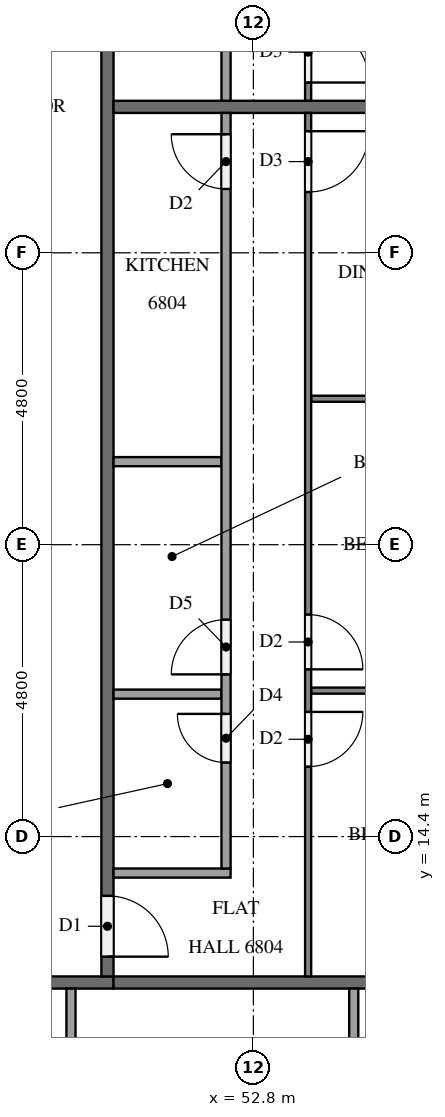
"""IFC4 building model, lengths in metres.
Left out: names, types, materials, properties, quantities, classifications, styles, units other than length and angle.
Written with IfcOpenShell. Run it as: python <this file> out.ifc"""

import sys

from ifc_helpers import new_model, si_unit, direction, frame, frame_2d, origin, place, context, subcontext, project, spatial, rectangle, extrude, element, fill, save


model = new_model("IFC4")
c1 = context("Model", 3, precision=1e-05, world=origin(), true_north=direction((0.0, 1.0)))
c2 = subcontext(c1, "Body", "Model", "MODEL_VIEW")
j1 = project(units=[si_unit("LENGTHUNIT", "METRE"), si_unit("PLANEANGLEUNIT", "RADIAN")], contexts=[c1])
p1 = place(None, origin())
s1 = spatial("IfcSite", under=j1, at=p1, CompositionType="ELEMENT")
p2 = place(p1, origin())
s2 = spatial("IfcBuilding", under=s1, at=p2, CompositionType="ELEMENT")
p3 = place(p2, frame((0.0, 0.0, 259.7)))
s3 = spatial("IfcBuildingStorey", under=s2, at=p3, CompositionType="ELEMENT", Elevation=259.7)
p4 = place(p3, frame((50.5, 12.0, 0.0), z_axis=(0.0, 0.0, 1.0), x_axis=(-1.0, 0.0, 0.0)))
e1 = element("IfcWall", 1, at=p4, inside=s3, PredefinedType="PARTITIONING", context=c2, shape_type="SweptSolid", body=[
    extrude(rectangle(XDim=38.6, YDim=0.2, at=frame_2d((19.3, 0.0))), origin(), (0.0, 0.0, 1.0), 3.1),
])
p5 = place(p4, frame((19.675, 0.0, 0.0)))
e2 = element("IfcOpeningElement", 2, at=p5, cuts=e1, PredefinedType="OPENING", context=c2, shape_type="SweptSolid", body=[
    extrude(rectangle(XDim=1.1, YDim=2.1, at=frame_2d((0.55, 1.05))), frame((0.0, 0.11, 0.0), z_axis=(0.0, -1.0, 0.0), x_axis=(1.0, 0.0, 0.0)), (0.0, 0.0, 1.0), 0.22),
])
p6 = place(p4, frame((2.925, 0.0, 0.0)))
e3 = element("IfcOpeningElement", 3, at=p6, cuts=e1, PredefinedType="OPENING", context=c2, shape_type="SweptSolid", body=[
    extrude(rectangle(XDim=1.0, YDim=2.1, at=frame_2d((0.5, 1.05))), frame((0.0, 0.11, 0.0), z_axis=(0.0, -1.0, 0.0), x_axis=(1.0, 0.0, 0.0)), (0.0, 0.0, 1.0), 0.22),
])
p7 = place(p4, frame((1.075, 0.0, 0.0)))
e4 = element("IfcOpeningElement", 4, at=p7, cuts=e1, PredefinedType="OPENING", context=c2, shape_type="SweptSolid", body=[
    extrude(rectangle(XDim=1.0, YDim=2.1, at=frame_2d((0.5, 1.05))), frame((0.0, 0.11, 0.0), z_axis=(0.0, -1.0, 0.0), x_axis=(1.0, 0.0, 0.0)), (0.0, 0.0, 1.0), 0.22),
])
p8 = place(p3, frame((50.4, 40.7, 0.0), z_axis=(0.0, 0.0, 1.0), x_axis=(0.0, -1.0, 0.0)))
e5 = element("IfcWall", 5, at=p8, inside=s3, PredefinedType="PARTITIONING", context=c2, shape_type="SweptSolid", body=[
    extrude(rectangle(XDim=28.6, YDim=0.2, at=frame_2d((14.3, 0.0))), origin(), (0.0, 0.0, 1.0), 3.1),
])
p9 = place(p8, frame((27.275, 0.0, 0.0)))
e6 = element("IfcOpeningElement", 6, at=p9, cuts=e5, PredefinedType="OPENING", context=c2, shape_type="SweptSolid", body=[
    extrude(rectangle(XDim=1.0, YDim=2.1, at=frame_2d((0.5, 1.05))), frame((0.0, 0.11, 0.0), z_axis=(0.0, -1.0, 0.0), x_axis=(1.0, 0.0, 0.0)), (0.0, 0.0, 1.0), 0.22),
])
p10 = place(p8, frame((7.525, 0.0, 0.0)))
e7 = element("IfcOpeningElement", 7, at=p10, cuts=e5, PredefinedType="OPENING", context=c2, shape_type="SweptSolid", body=[
    extrude(rectangle(XDim=1.0, YDim=2.1, at=frame_2d((0.5, 1.05))), frame((0.0, 0.11, 0.0), z_axis=(0.0, -1.0, 0.0), x_axis=(1.0, 0.0, 0.0)), (0.0, 0.0, 1.0), 0.22),
])
p11 = place(p8, frame((5.675, 0.0, 0.0)))
e8 = element("IfcOpeningElement", 8, at=p11, cuts=e5, PredefinedType="OPENING", context=c2, shape_type="SweptSolid", body=[
    extrude(rectangle(XDim=1.0, YDim=2.1, at=frame_2d((0.5, 1.05))), frame((0.0, 0.11, 0.0), z_axis=(0.0, -1.0, 0.0), x_axis=(1.0, 0.0, 0.0)), (0.0, 0.0, 1.0), 0.22),
])
for number, where, z_axis, x_axis in (
    (9, (50.5, 12.0, 0.0), (0.0, 0.0, 1.0), (1.0, 0.0, 0.0)),
    (10, (50.5, 26.4, 0.0), (0.0, 0.0, 1.0), (1.0, 0.0, 0.0)),
):
    element("IfcWall", number, at=place(p3, frame(where, z_axis=z_axis, x_axis=x_axis)), inside=s3, PredefinedType="PARTITIONING", context=c2, shape_type="SweptSolid", body=[
        extrude(rectangle(XDim=7.0, YDim=0.2, at=frame_2d((3.5, 0.0))), origin(), (0.0, 0.0, 1.0), 3.1),
    ])
p12 = place(p3, frame((54.45, 11.9, 0.0), z_axis=(0.0, 0.0, 1.0), x_axis=(0.0, -1.0, 0.0)))
e11 = element("IfcWall", 11, at=p12, inside=s3, PredefinedType="PARTITIONING", context=c2, shape_type="SweptSolid", body=[
    extrude(rectangle(XDim=2.075, YDim=0.15, at=frame_2d((1.038, 0.0))), origin(), (0.0, 0.0, 1.0), 3.1),
])
p13 = place(p3, frame((49.8, 11.9, 0.0), z_axis=(0.0, 0.0, 1.0), x_axis=(0.0, -1.0, 0.0)))
e12 = element("IfcWall", 12, at=p13, inside=s3, PredefinedType="PARTITIONING", context=c2, shape_type="SweptSolid", body=[
    extrude(rectangle(XDim=2.225, YDim=0.15, at=frame_2d((1.112, 0.0))), origin(), (0.0, 0.0, 1.0), 3.1),
])
for number, where, z_axis, x_axis in (
    (13, (53.75, 16.8, 0.0), (0.0, 0.0, 1.0), (1.0, 0.0, 0.0)),
    (14, (53.75, 21.6, 0.0), (0.0, 0.0, 1.0), (1.0, 0.0, 0.0)),
):
    element("IfcWall", number, at=place(p3, frame(where, z_axis=z_axis, x_axis=x_axis)), inside=s3, PredefinedType="PARTITIONING", context=c2, shape_type="SweptSolid", body=[
        extrude(rectangle(XDim=3.75, YDim=0.1, at=frame_2d((1.875, 0.0))), origin(), (0.0, 0.0, 1.0), 3.1),
    ])
p14 = place(p3, frame((53.7, 26.3, 0.0), z_axis=(0.0, 0.0, 1.0), x_axis=(0.0, -1.0, 0.0)))
e15 = element("IfcWall", 15, at=p14, inside=s3, PredefinedType="PARTITIONING", context=c2, shape_type="SweptSolid", body=[
    extrude(rectangle(XDim=14.2, YDim=0.1, at=frame_2d((7.1, 0.0))), origin(), (0.0, 0.0, 1.0), 3.1),
])
p15 = place(p14, frame((9.85, 0.0, 0.0)))
e16 = element("IfcOpeningElement", 16, at=p15, cuts=e15, PredefinedType="OPENING", context=c2, shape_type="SweptSolid", body=[
    extrude(rectangle(XDim=0.9, YDim=2.1, at=frame_2d((0.45, 1.05))), frame((0.0, 0.06, 0.0), z_axis=(0.0, -1.0, 0.0), x_axis=(1.0, 0.0, 0.0)), (0.0, 0.0, 1.0), 0.12),
])
p16 = place(p14, frame((8.25, 0.0, 0.0)))
e17 = element("IfcOpeningElement", 17, at=p16, cuts=e15, PredefinedType="OPENING", context=c2, shape_type="SweptSolid", body=[
    extrude(rectangle(XDim=0.9, YDim=2.1, at=frame_2d((0.45, 1.05))), frame((0.0, 0.06, 0.0), z_axis=(0.0, -1.0, 0.0), x_axis=(1.0, 0.0, 0.0)), (0.0, 0.0, 1.0), 0.12),
])
p17 = place(p14, frame((0.3, 0.0, 0.0)))
e18 = element("IfcOpeningElement", 18, at=p17, cuts=e15, PredefinedType="OPENING", context=c2, shape_type="SweptSolid", body=[
    extrude(rectangle(XDim=1.0, YDim=2.1, at=frame_2d((0.5, 1.05))), frame((0.0, 0.06, 0.0), z_axis=(0.0, -1.0, 0.0), x_axis=(1.0, 0.0, 0.0)), (0.0, 0.0, 1.0), 0.12),
])
for number, where, z_axis, x_axis in (
    (19, (50.5, 16.742, 0.0), (0.0, 0.0, 1.0), (1.0, 0.0, 0.0)),
    (20, (50.5, 20.565, 0.0), (0.0, 0.0, 1.0), (1.0, 0.0, 0.0)),
):
    element("IfcWall", number, at=place(p3, frame(where, z_axis=z_axis, x_axis=x_axis)), inside=s3, PredefinedType="PARTITIONING", context=c2, shape_type="SweptSolid", body=[
        extrude(rectangle(XDim=1.775, YDim=0.15, at=frame_2d((0.887, 0.0))), origin(), (0.0, 0.0, 1.0), 3.1),
    ])
p18 = place(p3, frame((50.5, 13.8, 0.0), z_axis=(0.0, 0.0, 1.0), x_axis=(1.0, 0.0, 0.0)))
e21 = element("IfcWall", 21, at=p18, inside=s3, PredefinedType="PARTITIONING", context=c2, shape_type="SweptSolid", body=[
    extrude(rectangle(XDim=1.925, YDim=0.15, at=frame_2d((0.962, 0.0))), origin(), (0.0, 0.0, 1.0), 3.1),
])
p19 = place(p3, frame((52.35, 13.875, 0.0), z_axis=(0.0, 0.0, 1.0), x_axis=(0.0, 1.0, 0.0)))
e22 = element("IfcWall", 22, at=p19, inside=s3, PredefinedType="PARTITIONING", context=c2, shape_type="SweptSolid", body=[
    extrude(rectangle(XDim=12.425, YDim=0.15, at=frame_2d((6.212, 0.0))), origin(), (0.0, 0.0, 1.0), 3.1),
])
p20 = place(p19, frame((1.742, 0.0, 0.0)))
e23 = element("IfcOpeningElement", 23, at=p20, cuts=e22, PredefinedType="OPENING", context=c2, shape_type="SweptSolid", body=[
    extrude(rectangle(XDim=0.8, YDim=2.1, at=frame_2d((0.4, 1.05))), frame((0.0, 0.085, 0.0), z_axis=(0.0, -1.0, 0.0), x_axis=(1.0, 0.0, 0.0)), (0.0, 0.0, 1.0), 0.17),
])
p21 = place(p19, frame((3.192, 0.0, 0.0)))
e24 = element("IfcOpeningElement", 24, at=p21, cuts=e22, PredefinedType="OPENING", context=c2, shape_type="SweptSolid", body=[
    extrude(rectangle(XDim=0.9, YDim=2.1, at=frame_2d((0.45, 1.05))), frame((0.0, 0.085, 0.0), z_axis=(0.0, -1.0, 0.0), x_axis=(1.0, 0.0, 0.0)), (0.0, 0.0, 1.0), 0.17),
])
p22 = place(p19, frame((11.175, 0.0, 0.0)))
e25 = element("IfcOpeningElement", 25, at=p22, cuts=e22, PredefinedType="OPENING", context=c2, shape_type="SweptSolid", body=[
    extrude(rectangle(XDim=0.9, YDim=2.1, at=frame_2d((0.45, 1.05))), frame((0.0, 0.085, 0.0), z_axis=(0.0, -1.0, 0.0), x_axis=(1.0, 0.0, 0.0)), (0.0, 0.0, 1.0), 0.17),
])
p23 = place(p3, frame((53.7, 33.5, 0.0), z_axis=(0.0, 0.0, 1.0), x_axis=(0.0, -1.0, 0.0)))
e26 = element("IfcWall", 26, at=p23, inside=s3, PredefinedType="PARTITIONING", context=c2, shape_type="SweptSolid", body=[
    extrude(rectangle(XDim=7.0, YDim=0.1, at=frame_2d((3.5, 0.0))), origin(), (0.0, 0.0, 1.0), 3.1),
])
p24 = place(p23, frame((5.7, 0.0, 0.0)))
e27 = element("IfcOpeningElement", 27, at=p24, cuts=e26, PredefinedType="OPENING", context=c2, shape_type="SweptSolid", body=[
    extrude(rectangle(XDim=1.0, YDim=2.1, at=frame_2d((0.5, 1.05))), frame((0.0, 0.06, 0.0), z_axis=(0.0, -1.0, 0.0), x_axis=(1.0, 0.0, 0.0)), (0.0, 0.0, 1.0), 0.12),
])
p25 = place(p3, frame((52.35, 26.5, 0.0), z_axis=(0.0, 0.0, 1.0), x_axis=(0.0, 1.0, 0.0)))
e28 = element("IfcWall", 28, at=p25, inside=s3, PredefinedType="PARTITIONING", context=c2, shape_type="SweptSolid", body=[
    extrude(rectangle(XDim=5.225, YDim=0.15, at=frame_2d((2.613, 0.0))), origin(), (0.0, 0.0, 1.0), 3.1),
])
p26 = place(p25, frame((2.415, 0.0, 0.0)))
e29 = element("IfcOpeningElement", 29, at=p26, cuts=e28, PredefinedType="OPENING", context=c2, shape_type="SweptSolid", body=[
    extrude(rectangle(XDim=0.9, YDim=2.1, at=frame_2d((0.45, 1.05))), frame((0.0, 0.085, 0.0), z_axis=(0.0, -1.0, 0.0), x_axis=(1.0, 0.0, 0.0)), (0.0, 0.0, 1.0), 0.17),
])
p27 = place(p25, frame((0.965, 0.0, 0.0)))
e30 = element("IfcOpeningElement", 30, at=p27, cuts=e28, PredefinedType="OPENING", context=c2, shape_type="SweptSolid", body=[
    extrude(rectangle(XDim=0.8, YDim=2.1, at=frame_2d((0.4, 1.05))), frame((0.0, 0.085, 0.0), z_axis=(0.0, -1.0, 0.0), x_axis=(1.0, 0.0, 0.0)), (0.0, 0.0, 1.0), 0.17),
])
p28 = place(p9, origin())
e31 = element("IfcDoor", 31, at=p28, inside=s3, OperationType="SINGLE_SWING_RIGHT", PredefinedType="DOOR", context=c2, shape_type="SweptSolid", body=[
    extrude(rectangle(XDim=1.0, YDim=2.1, at=frame_2d((0.5, 1.05))), frame((0.0, 0.025, 0.0), z_axis=(0.0, -1.0, 0.0), x_axis=(1.0, 0.0, 0.0)), (0.0, 0.0, 1.0), 0.05),
])
fill(e6, e31)
p29 = place(p15, origin())
e32 = element("IfcDoor", 32, at=p29, inside=s3, OperationType="SINGLE_SWING_LEFT", PredefinedType="DOOR", context=c2, shape_type="SweptSolid", body=[
    extrude(rectangle(XDim=0.9, YDim=2.1, at=frame_2d((0.45, 1.05))), frame((0.0, 0.025, 0.0), z_axis=(0.0, -1.0, 0.0), x_axis=(1.0, 0.0, 0.0)), (0.0, 0.0, 1.0), 0.05),
])
fill(e16, e32)
p30 = place(p16, origin())
e33 = element("IfcDoor", 33, at=p30, inside=s3, OperationType="SINGLE_SWING_RIGHT", PredefinedType="DOOR", context=c2, shape_type="SweptSolid", body=[
    extrude(rectangle(XDim=0.9, YDim=2.1, at=frame_2d((0.45, 1.05))), frame((0.0, 0.025, 0.0), z_axis=(0.0, -1.0, 0.0), x_axis=(1.0, 0.0, 0.0)), (0.0, 0.0, 1.0), 0.05),
])
fill(e17, e33)
p31 = place(p17, origin())
e34 = element("IfcDoor", 34, at=p31, inside=s3, OperationType="SINGLE_SWING_LEFT", PredefinedType="DOOR", context=c2, shape_type="SweptSolid", body=[
    extrude(rectangle(XDim=1.0, YDim=2.1, at=frame_2d((0.5, 1.05))), frame((0.0, 0.025, 0.0), z_axis=(0.0, -1.0, 0.0), x_axis=(1.0, 0.0, 0.0)), (0.0, 0.0, 1.0), 0.05),
])
fill(e18, e34)
p32 = place(p20, origin())
e35 = element("IfcDoor", 35, at=p32, inside=s3, OperationType="SINGLE_SWING_RIGHT", PredefinedType="DOOR", context=c2, shape_type="SweptSolid", body=[
    extrude(rectangle(XDim=0.8, YDim=2.1, at=frame_2d((0.4, 1.05))), frame((0.0, 0.025, 0.0), z_axis=(0.0, -1.0, 0.0), x_axis=(1.0, 0.0, 0.0)), (0.0, 0.0, 1.0), 0.05),
])
fill(e23, e35)
p33 = place(p21, origin())
e36 = element("IfcDoor", 36, at=p33, inside=s3, OperationType="SINGLE_SWING_LEFT", PredefinedType="DOOR", context=c2, shape_type="SweptSolid", body=[
    extrude(rectangle(XDim=0.9, YDim=2.1, at=frame_2d((0.45, 1.05))), frame((0.0, 0.025, 0.0), z_axis=(0.0, -1.0, 0.0), x_axis=(1.0, 0.0, 0.0)), (0.0, 0.0, 1.0), 0.05),
])
fill(e24, e36)
p34 = place(p22, origin())
e37 = element("IfcDoor", 37, at=p34, inside=s3, OperationType="SINGLE_SWING_RIGHT", PredefinedType="DOOR", context=c2, shape_type="SweptSolid", body=[
    extrude(rectangle(XDim=0.9, YDim=2.1, at=frame_2d((0.45, 1.05))), frame((0.0, 0.025, 0.0), z_axis=(0.0, -1.0, 0.0), x_axis=(1.0, 0.0, 0.0)), (0.0, 0.0, 1.0), 0.05),
])
fill(e25, e37)
p35 = place(p24, origin())
e38 = element("IfcDoor", 38, at=p35, inside=s3, OperationType="SINGLE_SWING_RIGHT", PredefinedType="DOOR", context=c2, shape_type="SweptSolid", body=[
    extrude(rectangle(XDim=1.0, YDim=2.1, at=frame_2d((0.5, 1.05))), frame((0.0, 0.025, 0.0), z_axis=(0.0, -1.0, 0.0), x_axis=(1.0, 0.0, 0.0)), (0.0, 0.0, 1.0), 0.05),
])
fill(e27, e38)
save(model, sys.argv[1])
